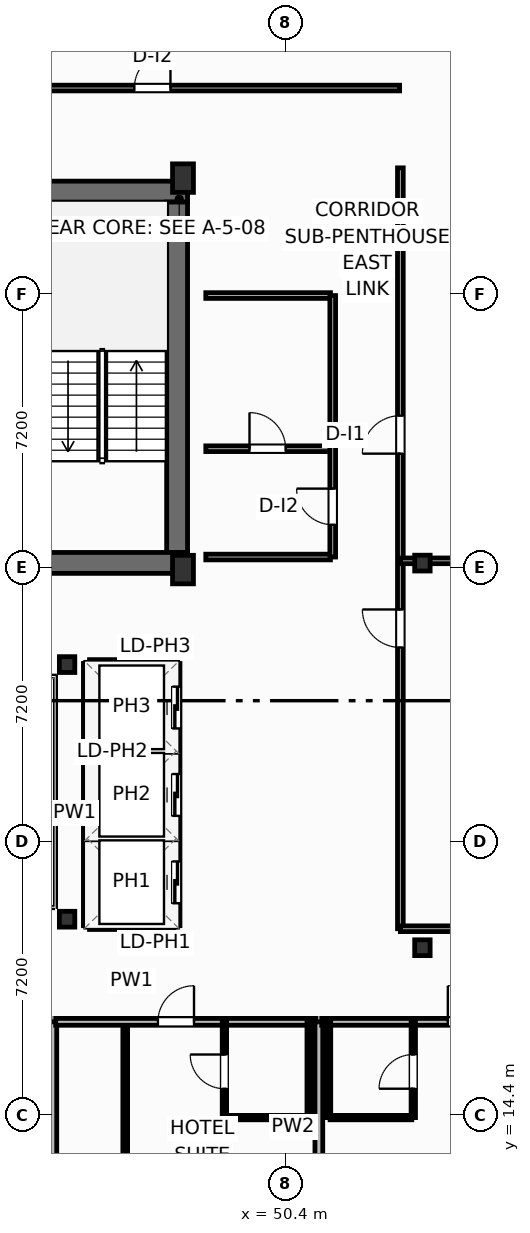
"""IFC4 building model, lengths in metres.
Left out: names, types, materials, properties, quantities, classifications, styles, units other than length and angle.
Written with IfcOpenShell. Run it as: python <this file> out.ifc"""

import sys

from ifc_helpers import new_model, si_unit, direction, frame, frame_2d, origin, origin_2d, place, context, subcontext, project, spatial, rectangle, i_section, extrude, element, fill, save


model = new_model("IFC4")
c1 = context("Model", 3, precision=1e-05, world=origin(), true_north=direction((0.0, 1.0)))
c2 = subcontext(c1, "Body", "Model", "MODEL_VIEW")
j1 = project(units=[si_unit("LENGTHUNIT", "METRE"), si_unit("PLANEANGLEUNIT", "RADIAN")], contexts=[c1])
p1 = place(None, origin())
s1 = spatial("IfcSite", under=j1, at=p1, CompositionType="ELEMENT")
p2 = place(p1, origin())
s2 = spatial("IfcBuilding", under=s1, at=p2, CompositionType="ELEMENT")
p3 = place(p2, frame((0.0, 0.0, 284.1)))
s3 = spatial("IfcBuildingStorey", under=s2, at=p3, CompositionType="ELEMENT", Elevation=284.1)
for number, where, z_axis, x_axis in (
    (1, (47.7, 28.75, 0.0), (0.0, 0.0, 1.0), (1.0, 0.0, 0.0)),
    (2, (47.7, 39.05, 0.0), (0.0, 0.0, 1.0), (1.0, 0.0, 0.0)),
):
    element("IfcColumn", number, at=place(p3, frame(where, z_axis=z_axis, x_axis=x_axis)), inside=s3, PredefinedType="COLUMN", context=c2, shape_type="SweptSolid", body=[
        extrude(rectangle(XDim=0.55, YDim=0.75, at=origin_2d()), origin(), (0.0, 0.0, 1.0), 3.7),
    ])
for number, where, z_axis, x_axis in (
    (3, (44.65, 19.55, 0.0), (0.0, 0.0, 1.0), (1.0, 0.0, 0.0)),
    (4, (44.65, 26.25, 0.0), (0.0, 0.0, 1.0), (1.0, 0.0, 0.0)),
    (5, (54.0, 18.8, 0.0), (0.0, 0.0, 1.0), (1.0, 0.0, 0.0)),
    (6, (54.0, 28.92, 0.0), (0.0, 0.0, 1.0), (1.0, 0.0, 0.0)),
):
    element("IfcColumn", number, at=place(p3, frame(where, z_axis=z_axis, x_axis=x_axis)), inside=s3, PredefinedType="COLUMN", context=c2, shape_type="SweptSolid", body=[
        extrude(i_section(OverallWidth=0.406, OverallDepth=0.416, WebThickness=0.03, FlangeThickness=0.048, FilletRadius=0.025, at=origin_2d()), origin(), (0.0, 0.0, 1.0), 3.7),
    ])
p4 = place(p3, frame((30.58, 38.695, 0.0), z_axis=(0.0, 0.0, 1.0), x_axis=(1.0, 0.0, 0.0)))
e7 = element("IfcWall", 7, at=p4, inside=s3, PredefinedType="SHEAR", context=c2, shape_type="SweptSolid", body=[
    extrude(rectangle(XDim=17.24, YDim=0.55, at=frame_2d((8.62, 0.0))), origin(), (0.0, 0.0, 1.0), 3.45),
])
p5 = place(p3, frame((47.545, 29.2, 0.0), z_axis=(0.0, 0.0, 1.0), x_axis=(0.0, 1.0, 0.0)))
e8 = element("IfcWall", 8, at=p5, inside=s3, PredefinedType="SHEAR", context=c2, shape_type="SweptSolid", body=[
    extrude(rectangle(XDim=9.22, YDim=0.55, at=frame_2d((4.61, 0.0))), origin(), (0.0, 0.0, 1.0), 3.45),
])
p6 = place(p3, frame((43.6, 28.925, 0.0), z_axis=(0.0, 0.0, 1.0), x_axis=(1.0, 0.0, 0.0)))
e9 = element("IfcWall", 9, at=p6, inside=s3, PredefinedType="SHEAR", context=c2, shape_type="SweptSolid", body=[
    extrude(rectangle(XDim=4.22, YDim=0.55, at=frame_2d((2.11, 0.0))), origin(), (0.0, 0.0, 1.0), 3.45),
])
p7 = place(p3, frame((53.49, 10.275, 0.0), z_axis=(0.0, 0.0, 1.0), x_axis=(0.823530942962, 0.56727135128, 0.0)))
e10 = element("IfcWall", 10, at=p7, inside=s3, PredefinedType="SOLIDWALL", context=c2, shape_type="SweptSolid", body=[
    extrude(rectangle(XDim=8.035, YDim=0.22, at=frame_2d((4.018, 0.0))), origin(), (0.0, 0.0, 1.0), 2.73),
])
p8 = place(p7, frame((2.817, 0.0, 0.8)))
e11 = element("IfcOpeningElement", 11, at=p8, cuts=e10, PredefinedType="OPENING", context=c2, shape_type="SweptSolid", body=[
    extrude(rectangle(XDim=2.4, YDim=1.85, at=frame_2d((1.2, 0.925))), frame((0.0, 0.12, 0.0), z_axis=(0.0, -1.0, 0.0), x_axis=(1.0, 0.0, 0.0)), (0.0, 0.0, 1.0), 0.24),
])
p9 = place(p3, frame((44.275, 3.952, 0.0), z_axis=(0.0, 0.0, 1.0), x_axis=(0.0, 1.0, 0.0)))
e12 = element("IfcWall", 12, at=p9, inside=s3, PredefinedType="PARTITIONING", context=c2, shape_type="SweptSolid", body=[
    extrude(rectangle(XDim=12.898, YDim=0.205, at=frame_2d((6.449, 0.0))), origin(), (0.0, 0.0, 1.0), 2.739),
])
p10 = place(p3, frame((46.18, 5.264, 0.0), z_axis=(0.0, 0.0, 1.0), x_axis=(0.0, 1.0, 0.0)))
e13 = element("IfcWall", 13, at=p10, inside=s3, PredefinedType="PARTITIONING", context=c2, shape_type="SweptSolid", body=[
    extrude(rectangle(XDim=11.586, YDim=0.125, at=frame_2d((5.793, 0.0))), origin(), (0.0, 0.0, 1.0), 3.45),
])
p11 = place(p10, frame((4.267, 0.0, 0.0)))
e14 = element("IfcOpeningElement", 14, at=p11, cuts=e13, PredefinedType="OPENING", context=c2, shape_type="SweptSolid", body=[
    extrude(rectangle(XDim=0.92, YDim=2.05, at=frame_2d((0.46, 1.025))), frame((0.0, 0.073, 0.0), z_axis=(0.0, -1.0, 0.0), x_axis=(1.0, 0.0, 0.0)), (0.0, 0.0, 1.0), 0.145),
])
p12 = place(p3, frame((44.35, 16.85, 0.0), z_axis=(0.0, 0.0, 1.0), x_axis=(1.0, 0.0, 0.0)))
e15 = element("IfcWall", 15, at=p12, inside=s3, PredefinedType="PARTITIONING", context=c2, shape_type="SweptSolid", body=[
    extrude(rectangle(XDim=6.85, YDim=0.18, at=frame_2d((3.425, 0.0))), origin(), (0.0, 0.0, 1.0), 3.45),
])
p13 = place(p12, frame((2.69, 0.0, 0.0)))
e16 = element("IfcOpeningElement", 16, at=p13, cuts=e15, PredefinedType="OPENING", context=c2, shape_type="SweptSolid", body=[
    extrude(rectangle(XDim=0.95, YDim=2.15, at=frame_2d((0.475, 1.075))), frame((0.0, 0.1, 0.0), z_axis=(0.0, -1.0, 0.0), x_axis=(1.0, 0.0, 0.0)), (0.0, 0.0, 1.0), 0.2),
])
p14 = place(p3, frame((48.83, 14.33, 0.0), z_axis=(0.0, 0.0, 1.0), x_axis=(1.0, 0.0, 0.0)))
e17 = element("IfcWall", 17, at=p14, inside=s3, PredefinedType="PARTITIONING", context=c2, shape_type="SweptSolid", body=[
    extrude(rectangle(XDim=2.15, YDim=0.115, at=frame_2d((1.075, 0.0))), origin(), (0.0, 0.0, 1.0), 3.45),
])
p15 = place(p3, frame((48.79, 14.33, 0.0), z_axis=(0.0, 0.0, 1.0), x_axis=(0.0, 1.0, 0.0)))
e18 = element("IfcWall", 18, at=p15, inside=s3, PredefinedType="PARTITIONING", context=c2, shape_type="SweptSolid", body=[
    extrude(rectangle(XDim=2.52, YDim=0.115, at=frame_2d((1.26, 0.0))), origin(), (0.0, 0.0, 1.0), 3.45),
])
p16 = place(p15, frame((0.76, 0.0, 0.0)))
e19 = element("IfcOpeningElement", 19, at=p16, cuts=e18, PredefinedType="OPENING", context=c2, shape_type="SweptSolid", body=[
    extrude(rectangle(XDim=0.9, YDim=2.05, at=frame_2d((0.45, 1.025))), frame((0.0, 0.067, 0.0), z_axis=(0.0, -1.0, 0.0), x_axis=(1.0, 0.0, 0.0)), (0.0, 0.0, 1.0), 0.135),
])
p17 = place(p3, frame((51.02, 14.33, 0.0), z_axis=(0.0, 0.0, 1.0), x_axis=(0.0, 1.0, 0.0)))
e20 = element("IfcWall", 20, at=p17, inside=s3, PredefinedType="PARTITIONING", context=c2, shape_type="SweptSolid", body=[
    extrude(rectangle(XDim=2.52, YDim=0.115, at=frame_2d((1.26, 0.0))), origin(), (0.0, 0.0, 1.0), 3.45),
])
p18 = place(p3, frame((51.275, 11.323, 0.0), z_axis=(0.0, 0.0, 1.0), x_axis=(0.0, 1.0, 0.0)))
e21 = element("IfcWall", 21, at=p18, inside=s3, PredefinedType="PARTITIONING", context=c2, shape_type="SweptSolid", body=[
    extrude(rectangle(XDim=5.527, YDim=0.205, at=frame_2d((2.763, 0.0))), origin(), (0.0, 0.0, 1.0), 3.45),
])
p19 = place(p3, frame((51.35, 16.85, 0.0), z_axis=(0.0, 0.0, 1.0), x_axis=(1.0, 0.0, 0.0)))
e22 = element("IfcWall", 22, at=p19, inside=s3, PredefinedType="PARTITIONING", context=c2, shape_type="SweptSolid", body=[
    extrude(rectangle(XDim=7.15, YDim=0.18, at=frame_2d((3.575, 0.0))), origin(), (0.0, 0.0, 1.0), 3.45),
])
p20 = place(p19, frame((3.32, 0.0, 0.0)))
e23 = element("IfcOpeningElement", 23, at=p20, cuts=e22, PredefinedType="OPENING", context=c2, shape_type="SweptSolid", body=[
    extrude(rectangle(XDim=0.95, YDim=2.15, at=frame_2d((0.475, 1.075))), frame((0.0, 0.1, 0.0), z_axis=(0.0, -1.0, 0.0), x_axis=(1.0, 0.0, 0.0)), (0.0, 0.0, 1.0), 0.2),
])
p21 = place(p3, frame((51.57, 14.33, 0.0), z_axis=(0.0, 0.0, 1.0), x_axis=(1.0, 0.0, 0.0)))
e24 = element("IfcWall", 24, at=p21, inside=s3, PredefinedType="PARTITIONING", context=c2, shape_type="SweptSolid", body=[
    extrude(rectangle(XDim=2.15, YDim=0.115, at=frame_2d((1.075, 0.0))), origin(), (0.0, 0.0, 1.0), 3.45),
])
p22 = place(p3, frame((53.76, 14.33, 0.0), z_axis=(0.0, 0.0, 1.0), x_axis=(0.0, 1.0, 0.0)))
e25 = element("IfcWall", 25, at=p22, inside=s3, PredefinedType="PARTITIONING", context=c2, shape_type="SweptSolid", body=[
    extrude(rectangle(XDim=2.52, YDim=0.115, at=frame_2d((1.26, 0.0))), origin(), (0.0, 0.0, 1.0), 3.45),
])
p23 = place(p22, frame((0.76, 0.0, 0.0)))
e26 = element("IfcOpeningElement", 26, at=p23, cuts=e25, PredefinedType="OPENING", context=c2, shape_type="SweptSolid", body=[
    extrude(rectangle(XDim=0.9, YDim=2.05, at=frame_2d((0.45, 1.025))), frame((0.0, 0.067, 0.0), z_axis=(0.0, -1.0, 0.0), x_axis=(1.0, 0.0, 0.0)), (0.0, 0.0, 1.0), 0.135),
])
p24 = place(p3, frame((51.53, 14.33, 0.0), z_axis=(0.0, 0.0, 1.0), x_axis=(0.0, 1.0, 0.0)))
e27 = element("IfcWall", 27, at=p24, inside=s3, PredefinedType="PARTITIONING", context=c2, shape_type="SweptSolid", body=[
    extrude(rectangle(XDim=2.52, YDim=0.115, at=frame_2d((1.26, 0.0))), origin(), (0.0, 0.0, 1.0), 3.45),
])
p25 = place(p3, frame((53.42, 19.3, 0.0), z_axis=(0.0, 0.0, 1.0), x_axis=(0.0, 1.0, 0.0)))
e28 = element("IfcWall", 28, at=p25, inside=s3, PredefinedType="PARTITIONING", context=c2, shape_type="SweptSolid", body=[
    extrude(rectangle(XDim=20.02, YDim=0.15, at=frame_2d((10.01, 0.0))), origin(), (0.0, 0.0, 1.0), 3.45),
])
p26 = place(p25, frame((7.4, 0.0, 0.0)))
e29 = element("IfcOpeningElement", 29, at=p26, cuts=e28, PredefinedType="OPENING", context=c2, shape_type="SweptSolid", body=[
    extrude(rectangle(XDim=1.0, YDim=2.05, at=frame_2d((0.5, 1.025))), frame((0.0, 0.085, 0.0), z_axis=(0.0, -1.0, 0.0), x_axis=(1.0, 0.0, 0.0)), (0.0, 0.0, 1.0), 0.17),
])
p27 = place(p25, frame((12.5, 0.0, 0.0)))
e30 = element("IfcOpeningElement", 30, at=p27, cuts=e28, PredefinedType="OPENING", context=c2, shape_type="SweptSolid", body=[
    extrude(rectangle(XDim=1.0, YDim=2.05, at=frame_2d((0.5, 1.025))), frame((0.0, 0.085, 0.0), z_axis=(0.0, -1.0, 0.0), x_axis=(1.0, 0.0, 0.0)), (0.0, 0.0, 1.0), 0.17),
])
p28 = place(p3, frame((53.42, 19.3, 0.0), z_axis=(0.0, 0.0, 1.0), x_axis=(1.0, 0.0, 0.0)))
e31 = element("IfcWall", 31, at=p28, inside=s3, PredefinedType="PARTITIONING", context=c2, shape_type="SweptSolid", body=[
    extrude(rectangle(XDim=9.435, YDim=0.15, at=frame_2d((4.718, 0.0))), origin(), (0.0, 0.0, 1.0), 2.739),
])
p29 = place(p3, frame((53.42, 28.98, 0.0), z_axis=(0.0, 0.0, 1.0), x_axis=(1.0, 0.0, 0.0)))
e32 = element("IfcWall", 32, at=p29, inside=s3, PredefinedType="PARTITIONING", context=c2, shape_type="SweptSolid", body=[
    extrude(rectangle(XDim=16.58, YDim=0.15, at=frame_2d((8.29, 0.0))), origin(), (0.0, 0.0, 1.0), 2.662),
])
p30 = place(p3, frame((31.92, 41.42, 0.0), z_axis=(0.0, 0.0, 1.0), x_axis=(1.0, 0.0, 0.0)))
e33 = element("IfcWall", 33, at=p30, inside=s3, PredefinedType="PARTITIONING", context=c2, shape_type="SweptSolid", body=[
    extrude(rectangle(XDim=21.48, YDim=0.15, at=frame_2d((10.74, 0.0))), origin(), (0.0, 0.0, 1.0), 3.45),
])
p31 = place(p30, frame((5.2, 0.0, 0.0)))
e34 = element("IfcOpeningElement", 34, at=p31, cuts=e33, PredefinedType="OPENING", context=c2, shape_type="SweptSolid", body=[
    extrude(rectangle(XDim=0.95, YDim=2.15, at=frame_2d((0.475, 1.075))), frame((0.0, 0.085, 0.0), z_axis=(0.0, -1.0, 0.0), x_axis=(1.0, 0.0, 0.0)), (0.0, 0.0, 1.0), 0.17),
])
p32 = place(p30, frame((14.5, 0.0, 0.0)))
e35 = element("IfcOpeningElement", 35, at=p32, cuts=e33, PredefinedType="OPENING", context=c2, shape_type="SweptSolid", body=[
    extrude(rectangle(XDim=0.95, YDim=2.05, at=frame_2d((0.475, 1.025))), frame((0.0, 0.085, 0.0), z_axis=(0.0, -1.0, 0.0), x_axis=(1.0, 0.0, 0.0)), (0.0, 0.0, 1.0), 0.17),
])
p33 = place(p3, frame((48.3, 31.93, 0.0), z_axis=(0.0, 0.0, 1.0), x_axis=(1.0, 0.0, 0.0)))
e36 = element("IfcWall", 36, at=p33, inside=s3, PredefinedType="PARTITIONING", context=c2, shape_type="SweptSolid", body=[
    extrude(rectangle(XDim=3.28, YDim=0.15, at=frame_2d((1.64, 0.0))), origin(), (0.0, 0.0, 1.0), 3.45),
])
p34 = place(p33, frame((1.15, 0.0, 0.0)))
e37 = element("IfcOpeningElement", 37, at=p34, cuts=e36, PredefinedType="OPENING", context=c2, shape_type="SweptSolid", body=[
    extrude(rectangle(XDim=0.95, YDim=2.05, at=frame_2d((0.475, 1.025))), frame((0.0, 0.085, 0.0), z_axis=(0.0, -1.0, 0.0), x_axis=(1.0, 0.0, 0.0)), (0.0, 0.0, 1.0), 0.17),
])
p35 = place(p3, frame((48.3, 29.08, 0.0), z_axis=(0.0, 0.0, 1.0), x_axis=(1.0, 0.0, 0.0)))
e38 = element("IfcWall", 38, at=p35, inside=s3, PredefinedType="PARTITIONING", context=c2, shape_type="SweptSolid", body=[
    extrude(rectangle(XDim=3.28, YDim=0.15, at=frame_2d((1.64, 0.0))), origin(), (0.0, 0.0, 1.0), 2.662),
])
p36 = place(p3, frame((48.3, 35.96, 0.0), z_axis=(0.0, 0.0, 1.0), x_axis=(1.0, 0.0, 0.0)))
e39 = element("IfcWall", 39, at=p36, inside=s3, PredefinedType="PARTITIONING", context=c2, shape_type="SweptSolid", body=[
    extrude(rectangle(XDim=3.28, YDim=0.15, at=frame_2d((1.64, 0.0))), origin(), (0.0, 0.0, 1.0), 3.45),
])
p37 = place(p3, frame((51.64, 29.08, 0.0), z_axis=(0.0, 0.0, 1.0), x_axis=(0.0, 1.0, 0.0)))
e40 = element("IfcWall", 40, at=p37, inside=s3, PredefinedType="PARTITIONING", context=c2, shape_type="SweptSolid", body=[
    extrude(rectangle(XDim=6.88, YDim=0.15, at=frame_2d((3.44, 0.0))), origin(), (0.0, 0.0, 1.0), 3.45),
])
p38 = place(p37, frame((0.85, 0.0, 0.0)))
e41 = element("IfcOpeningElement", 41, at=p38, cuts=e40, PredefinedType="OPENING", context=c2, shape_type="SweptSolid", body=[
    extrude(rectangle(XDim=0.95, YDim=2.05, at=frame_2d((0.475, 1.025))), frame((0.0, 0.085, 0.0), z_axis=(0.0, -1.0, 0.0), x_axis=(1.0, 0.0, 0.0)), (0.0, 0.0, 1.0), 0.17),
])
for number, where, z_axis, x_axis in (
    (42, (45.24, 21.675, 0.0), (0.0, 0.0, 1.0), (1.0, 0.0, 0.0)),
    (43, (45.24, 23.975, 0.0), (0.0, 0.0, 1.0), (1.0, 0.0, 0.0)),
):
    element("IfcWall", number, at=place(p3, frame(where, z_axis=z_axis, x_axis=x_axis)), inside=s3, PredefinedType="PARTITIONING", context=c2, shape_type="SweptSolid", body=[
        extrude(rectangle(XDim=2.22, YDim=0.2, at=frame_2d((1.11, 0.0))), origin(), (0.0, 0.0, 1.0), 3.45),
    ])
p39 = place(p3, frame((45.24, 19.38, 0.0), z_axis=(0.0, 0.0, 1.0), x_axis=(1.0, 0.0, 0.0)))
e44 = element("IfcWall", 44, at=p39, inside=s3, PredefinedType="PARTITIONING", context=c2, shape_type="SweptSolid", body=[
    extrude(rectangle(XDim=2.22, YDim=0.2, at=frame_2d((1.11, 0.0))), origin(), (0.0, 0.0, 1.0), 2.662),
])
p40 = place(p3, frame((45.24, 26.28, 0.0), z_axis=(0.0, 0.0, 1.0), x_axis=(1.0, 0.0, 0.0)))
e45 = element("IfcWall", 45, at=p40, inside=s3, PredefinedType="PARTITIONING", context=c2, shape_type="SweptSolid", body=[
    extrude(rectangle(XDim=2.22, YDim=0.2, at=frame_2d((1.11, 0.0))), origin(), (0.0, 0.0, 1.0), 3.45),
])
p41 = place(p3, frame((45.18, 19.38, 0.0), z_axis=(0.0, 0.0, 1.0), x_axis=(0.0, 1.0, 0.0)))
e46 = element("IfcWall", 46, at=p41, inside=s3, PredefinedType="PARTITIONING", context=c2, shape_type="SweptSolid", body=[
    extrude(rectangle(XDim=6.9, YDim=0.2, at=frame_2d((3.45, 0.0))), origin(), (0.0, 0.0, 1.0), 3.45),
])
p42 = place(p3, frame((47.52, 19.38, 0.0), z_axis=(0.0, 0.0, 1.0), x_axis=(0.0, 1.0, 0.0)))
e47 = element("IfcWall", 47, at=p42, inside=s3, PredefinedType="PARTITIONING", context=c2, shape_type="SweptSolid", body=[
    extrude(rectangle(XDim=6.9, YDim=0.2, at=frame_2d((3.45, 0.0))), origin(), (0.0, 0.0, 1.0), 3.45),
])
p43 = place(p42, frame((0.59, 0.0, 0.0)))
e48 = element("IfcOpeningElement", 48, at=p43, cuts=e47, PredefinedType="OPENING", context=c2, shape_type="SweptSolid", body=[
    extrude(rectangle(XDim=1.1, YDim=2.15, at=frame_2d((0.55, 1.075))), frame((0.0, 0.11, 0.0), z_axis=(0.0, -1.0, 0.0), x_axis=(1.0, 0.0, 0.0)), (0.0, 0.0, 1.0), 0.22),
])
p44 = place(p42, frame((2.89, 0.0, 0.0)))
e49 = element("IfcOpeningElement", 49, at=p44, cuts=e47, PredefinedType="OPENING", context=c2, shape_type="SweptSolid", body=[
    extrude(rectangle(XDim=1.1, YDim=2.15, at=frame_2d((0.55, 1.075))), frame((0.0, 0.11, 0.0), z_axis=(0.0, -1.0, 0.0), x_axis=(1.0, 0.0, 0.0)), (0.0, 0.0, 1.0), 0.22),
])
p45 = place(p42, frame((5.19, 0.0, 0.0)))
e50 = element("IfcOpeningElement", 50, at=p45, cuts=e47, PredefinedType="OPENING", context=c2, shape_type="SweptSolid", body=[
    extrude(rectangle(XDim=1.1, YDim=2.15, at=frame_2d((0.55, 1.075))), frame((0.0, 0.11, 0.0), z_axis=(0.0, -1.0, 0.0), x_axis=(1.0, 0.0, 0.0)), (0.0, 0.0, 1.0), 0.22),
])
p46 = place(p13, origin())
e51 = element("IfcDoor", 51, at=p46, inside=s3, OperationType="SINGLE_SWING_RIGHT", PredefinedType="DOOR", context=c2, shape_type="SweptSolid", body=[
    extrude(rectangle(XDim=0.95, YDim=2.15, at=frame_2d((0.475, 1.075))), frame((0.0, 0.025, 0.0), z_axis=(0.0, -1.0, 0.0), x_axis=(1.0, 0.0, 0.0)), (0.0, 0.0, 1.0), 0.05),
])
fill(e16, e51)
p47 = place(p16, origin())
e52 = element("IfcDoor", 52, at=p47, inside=s3, OperationType="SINGLE_SWING_RIGHT", PredefinedType="DOOR", context=c2, shape_type="SweptSolid", body=[
    extrude(rectangle(XDim=0.9, YDim=2.05, at=frame_2d((0.45, 1.025))), frame((0.0, 0.025, 0.0), z_axis=(0.0, -1.0, 0.0), x_axis=(1.0, 0.0, 0.0)), (0.0, 0.0, 1.0), 0.05),
])
fill(e19, e52)
p48 = place(p20, origin())
e53 = element("IfcDoor", 53, at=p48, inside=s3, OperationType="SINGLE_SWING_LEFT", PredefinedType="DOOR", context=c2, shape_type="SweptSolid", body=[
    extrude(rectangle(XDim=0.95, YDim=2.15, at=frame_2d((0.475, 1.075))), frame((0.0, 0.025, 0.0), z_axis=(0.0, -1.0, 0.0), x_axis=(1.0, 0.0, 0.0)), (0.0, 0.0, 1.0), 0.05),
])
fill(e23, e53)
p49 = place(p23, origin())
e54 = element("IfcDoor", 54, at=p49, inside=s3, OperationType="SINGLE_SWING_LEFT", PredefinedType="DOOR", context=c2, shape_type="SweptSolid", body=[
    extrude(rectangle(XDim=0.9, YDim=2.05, at=frame_2d((0.45, 1.025))), frame((0.0, 0.025, 0.0), z_axis=(0.0, -1.0, 0.0), x_axis=(1.0, 0.0, 0.0)), (0.0, 0.0, 1.0), 0.05),
])
fill(e26, e54)
p50 = place(p26, origin())
e55 = element("IfcDoor", 55, at=p50, inside=s3, OperationType="SINGLE_SWING_RIGHT", PredefinedType="DOOR", context=c2, shape_type="SweptSolid", body=[
    extrude(rectangle(XDim=1.0, YDim=2.05, at=frame_2d((0.5, 1.025))), frame((0.0, 0.025, 0.0), z_axis=(0.0, -1.0, 0.0), x_axis=(1.0, 0.0, 0.0)), (0.0, 0.0, 1.0), 0.05),
])
fill(e29, e55)
p51 = place(p27, origin())
e56 = element("IfcDoor", 56, at=p51, inside=s3, OperationType="SINGLE_SWING_LEFT", PredefinedType="DOOR", context=c2, shape_type="SweptSolid", body=[
    extrude(rectangle(XDim=1.0, YDim=2.05, at=frame_2d((0.5, 1.025))), frame((0.0, 0.025, 0.0), z_axis=(0.0, -1.0, 0.0), x_axis=(1.0, 0.0, 0.0)), (0.0, 0.0, 1.0), 0.05),
])
fill(e30, e56)
p52 = place(p32, origin())
e57 = element("IfcDoor", 57, at=p52, inside=s3, OperationType="SINGLE_SWING_RIGHT", PredefinedType="DOOR", context=c2, shape_type="SweptSolid", body=[
    extrude(rectangle(XDim=0.95, YDim=2.05, at=frame_2d((0.475, 1.025))), frame((0.0, 0.025, 0.0), z_axis=(0.0, -1.0, 0.0), x_axis=(1.0, 0.0, 0.0)), (0.0, 0.0, 1.0), 0.05),
])
fill(e35, e57)
p53 = place(p34, origin())
e58 = element("IfcDoor", 58, at=p53, inside=s3, OperationType="SINGLE_SWING_LEFT", PredefinedType="DOOR", context=c2, shape_type="SweptSolid", body=[
    extrude(rectangle(XDim=0.95, YDim=2.05, at=frame_2d((0.475, 1.025))), frame((0.0, 0.025, 0.0), z_axis=(0.0, -1.0, 0.0), x_axis=(1.0, 0.0, 0.0)), (0.0, 0.0, 1.0), 0.05),
])
fill(e37, e58)
p54 = place(p38, origin())
e59 = element("IfcDoor", 59, at=p54, inside=s3, OperationType="SINGLE_SWING_RIGHT", PredefinedType="DOOR", context=c2, shape_type="SweptSolid", body=[
    extrude(rectangle(XDim=0.95, YDim=2.05, at=frame_2d((0.475, 1.025))), frame((0.0, 0.025, 0.0), z_axis=(0.0, -1.0, 0.0), x_axis=(1.0, 0.0, 0.0)), (0.0, 0.0, 1.0), 0.05),
])
fill(e41, e59)
p55 = place(p43, origin())
e60 = element("IfcDoor", 60, at=p55, inside=s3, OperationType="SLIDING_TO_LEFT", PredefinedType="DOOR", context=c2, shape_type="SweptSolid", body=[
    extrude(rectangle(XDim=1.1, YDim=2.15, at=frame_2d((0.55, 1.075))), frame((0.0, 0.025, 0.0), z_axis=(0.0, -1.0, 0.0), x_axis=(1.0, 0.0, 0.0)), (0.0, 0.0, 1.0), 0.05),
])
fill(e48, e60)
p56 = place(p44, origin())
e61 = element("IfcDoor", 61, at=p56, inside=s3, OperationType="SLIDING_TO_LEFT", PredefinedType="DOOR", context=c2, shape_type="SweptSolid", body=[
    extrude(rectangle(XDim=1.1, YDim=2.15, at=frame_2d((0.55, 1.075))), frame((0.0, 0.025, 0.0), z_axis=(0.0, -1.0, 0.0), x_axis=(1.0, 0.0, 0.0)), (0.0, 0.0, 1.0), 0.05),
])
fill(e49, e61)
p57 = place(p45, origin())
e62 = element("IfcDoor", 62, at=p57, inside=s3, OperationType="SLIDING_TO_LEFT", PredefinedType="DOOR", context=c2, shape_type="SweptSolid", body=[
    extrude(rectangle(XDim=1.1, YDim=2.15, at=frame_2d((0.55, 1.075))), frame((0.0, 0.025, 0.0), z_axis=(0.0, -1.0, 0.0), x_axis=(1.0, 0.0, 0.0)), (0.0, 0.0, 1.0), 0.05),
])
fill(e50, e62)
save(model, sys.argv[1])
